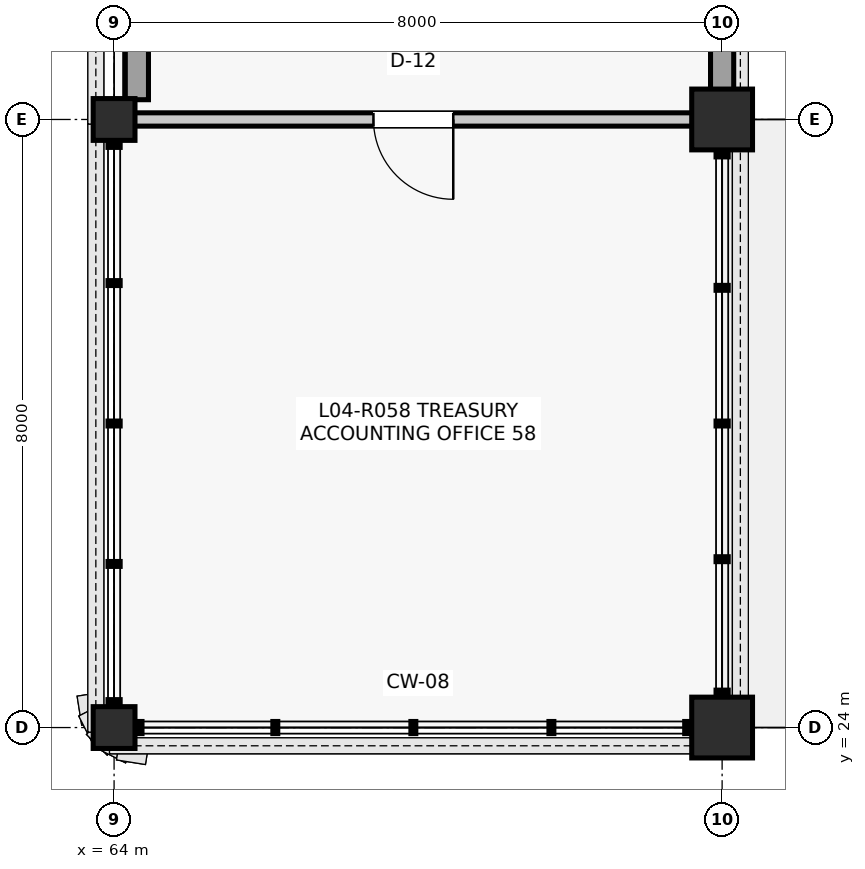
"""IFC4 building model, lengths in metres.
Left out: names, types, materials, properties, quantities, classifications, styles, units other than length and angle.
Written with IfcOpenShell. Run it as: python <this file> out.ifc"""

import sys

from ifc_helpers import new_model, si_unit, direction, frame, frame_2d, origin, origin_2d, place, context, subcontext, project, spatial, rectangle, extrude, element, fill, save


model = new_model("IFC4")
c1 = context("Model", 3, precision=1e-05, world=origin(), true_north=direction((0.0, 1.0)))
c2 = subcontext(c1, "Body", "Model", "MODEL_VIEW")
j1 = project(units=[si_unit("LENGTHUNIT", "METRE"), si_unit("PLANEANGLEUNIT", "RADIAN")], contexts=[c1])
p1 = place(None, origin())
s1 = spatial("IfcSite", under=j1, at=p1, CompositionType="ELEMENT")
p2 = place(p1, origin())
s2 = spatial("IfcBuilding", under=s1, at=p2, CompositionType="ELEMENT")
p3 = place(p2, frame((0.0, 0.0, 17.82)))
s3 = spatial("IfcBuildingStorey", under=s2, at=p3, CompositionType="ELEMENT", Elevation=17.82)
for number, where, z_axis, x_axis in (
    (1, (64.0, 24.0, 0.0), (0.0, 0.0, 1.0), (1.0, 0.0, 0.0)),
    (2, (64.0, 32.0, 0.0), (0.0, 0.0, 1.0), (1.0, 0.0, 0.0)),
):
    element("IfcColumn", number, at=place(p3, frame(where, z_axis=z_axis, x_axis=x_axis)), inside=s3, PredefinedType="COLUMN", context=c2, shape_type="SweptSolid", body=[
        extrude(rectangle(XDim=0.55, YDim=0.55, at=origin_2d()), origin(), (0.0, 0.0, 1.0), 3.96),
    ])
for number, where, z_axis, x_axis in (
    (3, (72.0, 24.0, 0.0), (0.0, 0.0, 1.0), (1.0, 0.0, 0.0)),
    (4, (72.0, 32.0, 0.0), (0.0, 0.0, 1.0), (1.0, 0.0, 0.0)),
):
    element("IfcColumn", number, at=place(p3, frame(where, z_axis=z_axis, x_axis=x_axis)), inside=s3, PredefinedType="COLUMN", context=c2, shape_type="SweptSolid", body=[
        extrude(rectangle(XDim=0.8, YDim=0.8, at=origin_2d()), origin(), (0.0, 0.0, 1.0), 3.96),
    ])
p4 = place(p3, frame((64.3, 32.26, 0.0), z_axis=(0.0, 0.0, 1.0), x_axis=(0.0, 1.0, 0.0)))
e5 = element("IfcWall", 5, at=p4, inside=s3, PredefinedType="SOLIDWALL", context=c2, shape_type="SweptSolid", body=[
    extrude(rectangle(XDim=7.48, YDim=0.305, at=frame_2d((3.74, 0.0))), origin(), (0.0, 0.0, 1.0), 3.285),
])
p5 = place(p3, frame((72.0, 32.385, 0.0), z_axis=(0.0, 0.0, 1.0), x_axis=(0.0, 1.0, 0.0)))
e6 = element("IfcWall", 6, at=p5, inside=s3, PredefinedType="SOLIDWALL", context=c2, shape_type="SweptSolid", body=[
    extrude(rectangle(XDim=7.23, YDim=0.305, at=frame_2d((3.615, 0.0))), origin(), (0.0, 0.0, 1.0), 3.002),
])
p6 = place(p5, frame((0.701, 0.0, 0.95)))
e7 = element("IfcOpeningElement", 7, at=p6, cuts=e6, PredefinedType="OPENING", context=c2, shape_type="SweptSolid", body=[
    extrude(rectangle(XDim=1.2, YDim=1.8, at=frame_2d((0.6, 0.9))), frame((0.0, 0.162, 0.0), z_axis=(0.0, -1.0, 0.0), x_axis=(1.0, 0.0, 0.0)), (0.0, 0.0, 1.0), 0.325),
])
p7 = place(p5, frame((5.329, 0.0, 0.95)))
e8 = element("IfcOpeningElement", 8, at=p7, cuts=e6, PredefinedType="OPENING", context=c2, shape_type="SweptSolid", body=[
    extrude(rectangle(XDim=1.2, YDim=1.8, at=frame_2d((0.6, 0.9))), frame((0.0, 0.162, 0.0), z_axis=(0.0, -1.0, 0.0), x_axis=(1.0, 0.0, 0.0)), (0.0, 0.0, 1.0), 0.325),
])
p8 = place(p3, frame((64.265, 32.0, 0.0), z_axis=(0.0, 0.0, 1.0), x_axis=(1.0, 0.0, 0.0)))
e9 = element("IfcWall", 9, at=p8, inside=s3, PredefinedType="PARTITIONING", context=c2, shape_type="SweptSolid", body=[
    extrude(rectangle(XDim=7.345, YDim=0.175, at=frame_2d((3.673, 0.0))), origin(), (0.0, 0.0, 1.0), 3.232),
])
p9 = place(p8, frame((3.147, 0.0, 0.0)))
e10 = element("IfcOpeningElement", 10, at=p9, cuts=e9, PredefinedType="OPENING", context=c2, shape_type="SweptSolid", body=[
    extrude(rectangle(XDim=1.05, YDim=2.15, at=frame_2d((0.525, 1.075))), frame((0.0, 0.097, 0.0), z_axis=(0.0, -1.0, 0.0), x_axis=(1.0, 0.0, 0.0)), (0.0, 0.0, 1.0), 0.195),
])
p10 = place(p9, frame((1.05, 0.0, 0.0), z_axis=(0.0, 0.0, 1.0), x_axis=(-1.0, 0.0, 0.0)))
e11 = element("IfcDoor", 11, at=p10, inside=s3, OperationType="SINGLE_SWING_RIGHT", PredefinedType="DOOR", context=c2, shape_type="SweptSolid", body=[
    extrude(rectangle(XDim=1.05, YDim=2.15, at=frame_2d((0.525, 1.075))), frame((0.0, 0.025, 0.0), z_axis=(0.0, -1.0, 0.0), x_axis=(1.0, 0.0, 0.0)), (0.0, 0.0, 1.0), 0.05),
])
fill(e10, e11)
save(model, sys.argv[1])
